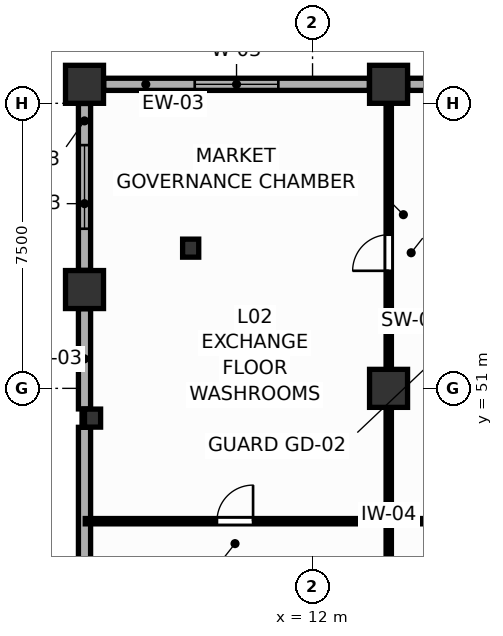
"""IFC4 building model, lengths in metres.
Left out: names, types, materials, properties, quantities, classifications, styles, units other than length and angle.
Written with IfcOpenShell. Run it as: python <this file> out.ifc"""

import sys

from ifc_helpers import new_model, si_unit, direction, frame, frame_2d, origin, origin_2d, place, context, subcontext, project, spatial, rectangle, i_section, extrude, source, transform, mapped, element, fill, save


model = new_model("IFC4")
c1 = context("Model", 3, precision=1e-05, world=origin(), true_north=direction((0.0, 1.0)))
c2 = subcontext(c1, "Body", "Model", "MODEL_VIEW")
j1 = project(units=[si_unit("LENGTHUNIT", "METRE"), si_unit("PLANEANGLEUNIT", "RADIAN")], contexts=[c1])
p1 = place(None, origin())
s1 = spatial("IfcSite", under=j1, at=p1, CompositionType="ELEMENT")
p2 = place(p1, origin())
s2 = spatial("IfcBuilding", under=s1, at=p2, CompositionType="ELEMENT")
p3 = place(p2, frame((0.0, 0.0, 9.6)))
s3 = spatial("IfcBuildingStorey", under=s2, at=p3, CompositionType="ELEMENT", Elevation=9.6)
m1 = source(origin(), c2, "Body", "SweptSolid", [
    extrude(rectangle(XDim=1.0, YDim=1.0, at=origin_2d()), origin(), (0.0, 0.0, 1.0), 4.8),
])
for number, where, z_axis, x_axis in (
    (1, (6.0, 53.6, 0.0), (0.0, 0.0, 1.0), (1.0, 0.0, 0.0)),
    (2, (6.0, 59.0, 0.0), (0.0, 0.0, 1.0), (1.0, 0.0, 0.0)),
    (3, (14.0, 59.0, 0.0), (0.0, 0.0, 1.0), (1.0, 0.0, 0.0)),
    (4, (14.0, 51.0, 0.0), (0.0, 0.0, 1.0), (1.0, 0.0, 0.0)),
):
    element("IfcColumn", number, at=place(p3, frame(where, z_axis=z_axis, x_axis=x_axis)), inside=s3, PredefinedType="COLUMN", context=c2, shape_type="MappedRepresentation", body=[
        mapped(m1, transform((0.0, 0.0, 0.0), scale=1.0)),
    ])
m2 = source(origin(), c2, "Body", "SweptSolid", [
    extrude(i_section(OverallWidth=0.424, OverallDepth=0.474, WebThickness=0.045, FlangeThickness=0.072, FilletRadius=0.015, at=origin_2d()), origin(), (0.0, 0.0, 1.0), 4.8),
])
for number, where, z_axis, x_axis in (
    (5, (8.793, 54.689, 0.0), (0.0, 0.0, 1.0), (1.0, 0.0, 0.0)),
    (6, (6.211, 50.217, 0.0), (0.0, 0.0, 1.0), (1.0, 0.0, 0.0)),
):
    element("IfcColumn", number, at=place(p3, frame(where, z_axis=z_axis, x_axis=x_axis)), inside=s3, PredefinedType="COLUMN", context=c2, shape_type="MappedRepresentation", body=[
        mapped(m2, transform((0.0, 0.0, 0.0), scale=1.0)),
    ])
p4 = place(p3, frame((6.505, 59.0, 0.0), z_axis=(0.0, 0.0, 1.0), x_axis=(1.0, 0.0, 0.0)))
e7 = element("IfcWall", 7, at=p4, inside=s3, PredefinedType="SOLIDWALL", context=c2, shape_type="SweptSolid", body=[
    extrude(rectangle(XDim=6.99, YDim=0.32, at=frame_2d((3.495, 0.0))), origin(), (0.0, 0.0, 1.0), 3.65),
])
p5 = place(p4, frame((2.395, 0.0, 0.75)))
e8 = element("IfcOpeningElement", 8, at=p5, cuts=e7, PredefinedType="OPENING", context=c2, shape_type="SweptSolid", body=[
    extrude(rectangle(XDim=2.2, YDim=2.0, at=frame_2d((1.1, 1.0))), frame((0.0, 0.17, 0.0), z_axis=(0.0, -1.0, 0.0), x_axis=(1.0, 0.0, 0.0)), (0.0, 0.0, 1.0), 0.34),
])
p6 = place(p3, frame((14.505, 59.0, 0.0), z_axis=(0.0, 0.0, 1.0), x_axis=(1.0, 0.0, 0.0)))
e9 = element("IfcWall", 9, at=p6, inside=s3, PredefinedType="SOLIDWALL", context=c2, shape_type="SweptSolid", body=[
    extrude(rectangle(XDim=12.59, YDim=0.32, at=frame_2d((6.295, 0.0))), origin(), (0.0, 0.0, 1.0), 3.65),
])
p7 = place(p6, frame((1.599, 0.0, 0.75)))
e10 = element("IfcOpeningElement", 10, at=p7, cuts=e9, PredefinedType="OPENING", context=c2, shape_type="SweptSolid", body=[
    extrude(rectangle(XDim=2.2, YDim=2.0, at=frame_2d((1.1, 1.0))), frame((0.0, 0.17, 0.0), z_axis=(0.0, -1.0, 0.0), x_axis=(1.0, 0.0, 0.0)), (0.0, 0.0, 1.0), 0.34),
])
p8 = place(p3, frame((6.0, 40.505, 0.0), z_axis=(0.0, 0.0, 1.0), x_axis=(0.0, 1.0, 0.0)))
e11 = element("IfcWall", 11, at=p8, inside=s3, PredefinedType="SOLIDWALL", context=c2, shape_type="SweptSolid", body=[
    extrude(rectangle(XDim=9.47, YDim=0.32, at=frame_2d((4.735, 0.0))), origin(), (0.0, 0.0, 1.0), 4.35),
])
p9 = place(p8, frame((3.635, 0.0, 0.75)))
e12 = element("IfcOpeningElement", 12, at=p9, cuts=e11, PredefinedType="OPENING", context=c2, shape_type="SweptSolid", body=[
    extrude(rectangle(XDim=2.2, YDim=2.0, at=frame_2d((1.1, 1.0))), frame((0.0, 0.17, 0.0), z_axis=(0.0, -1.0, 0.0), x_axis=(1.0, 0.0, 0.0)), (0.0, 0.0, 1.0), 0.34),
])
p10 = place(p3, frame((6.0, 50.459, 0.0), z_axis=(0.0, 0.0, 1.0), x_axis=(0.0, 1.0, 0.0)))
e13 = element("IfcWall", 13, at=p10, inside=s3, PredefinedType="SOLIDWALL", context=c2, shape_type="SweptSolid", body=[
    extrude(rectangle(XDim=2.636, YDim=0.32, at=frame_2d((1.318, 0.0))), origin(), (0.0, 0.0, 1.0), 4.35),
])
p11 = place(p3, frame((6.0, 54.105, 0.0), z_axis=(0.0, 0.0, 1.0), x_axis=(0.0, 1.0, 0.0)))
e14 = element("IfcWall", 14, at=p11, inside=s3, PredefinedType="SOLIDWALL", context=c2, shape_type="SweptSolid", body=[
    extrude(rectangle(XDim=4.39, YDim=0.32, at=frame_2d((2.195, 0.0))), origin(), (0.0, 0.0, 1.0), 4.35),
])
p12 = place(p11, frame((1.095, 0.0, 0.75)))
e15 = element("IfcOpeningElement", 15, at=p12, cuts=e14, PredefinedType="OPENING", context=c2, shape_type="SweptSolid", body=[
    extrude(rectangle(XDim=2.2, YDim=2.0, at=frame_2d((1.1, 1.0))), frame((0.0, 0.17, 0.0), z_axis=(0.0, -1.0, 0.0), x_axis=(1.0, 0.0, 0.0)), (0.0, 0.0, 1.0), 0.34),
])
p13 = place(p3, frame((14.005, 36.035, 0.0), z_axis=(0.0, 0.0, 1.0), x_axis=(0.0, 1.0, 0.0)))
e16 = element("IfcWall", 16, at=p13, inside=s3, PredefinedType="PARTITIONING", context=c2, shape_type="SweptSolid", body=[
    extrude(rectangle(XDim=22.945, YDim=0.14, at=frame_2d((11.473, 0.0))), origin(), (0.0, 0.0, 1.0), 4.35),
])
p14 = place(p13, frame((18.058, 0.0, 0.0)))
e17 = element("IfcOpeningElement", 17, at=p14, cuts=e16, PredefinedType="OPENING", context=c2, shape_type="SweptSolid", body=[
    extrude(rectangle(XDim=0.95, YDim=2.05, at=frame_2d((0.475, 1.025))), frame((0.0, 0.08, 0.0), z_axis=(0.0, -1.0, 0.0), x_axis=(1.0, 0.0, 0.0)), (0.0, 0.0, 1.0), 0.16),
])
p15 = place(p3, frame((6.02, 47.505, 0.0), z_axis=(0.0, 0.0, 1.0), x_axis=(1.0, 0.0, 0.0)))
e18 = element("IfcWall", 18, at=p15, inside=s3, PredefinedType="PARTITIONING", context=c2, shape_type="SweptSolid", body=[
    extrude(rectangle(XDim=13.563, YDim=0.14, at=frame_2d((6.781, 0.0))), origin(), (0.0, 0.0, 1.0), 4.35),
])
p16 = place(p15, frame((3.465, 0.0, 0.0)))
e19 = element("IfcOpeningElement", 19, at=p16, cuts=e18, PredefinedType="OPENING", context=c2, shape_type="SweptSolid", body=[
    extrude(rectangle(XDim=0.95, YDim=2.05, at=frame_2d((0.475, 1.025))), frame((0.0, 0.08, 0.0), z_axis=(0.0, -1.0, 0.0), x_axis=(1.0, 0.0, 0.0)), (0.0, 0.0, 1.0), 0.16),
])
p17 = place(p5, origin())
e20 = element("IfcWindow", 20, at=p17, inside=s3, PartitioningType="SINGLE_PANEL", PredefinedType="WINDOW", context=c2, shape_type="SweptSolid", body=[
    extrude(rectangle(XDim=2.2, YDim=2.0, at=frame_2d((1.1, 1.0))), frame((0.0, 0.03, 0.0), z_axis=(0.0, -1.0, 0.0), x_axis=(1.0, 0.0, 0.0)), (0.0, 0.0, 1.0), 0.06),
])
fill(e8, e20)
p18 = place(p12, origin())
e21 = element("IfcWindow", 21, at=p18, inside=s3, PartitioningType="SINGLE_PANEL", PredefinedType="WINDOW", context=c2, shape_type="SweptSolid", body=[
    extrude(rectangle(XDim=2.2, YDim=2.0, at=frame_2d((1.1, 1.0))), frame((0.0, 0.03, 0.0), z_axis=(0.0, -1.0, 0.0), x_axis=(1.0, 0.0, 0.0)), (0.0, 0.0, 1.0), 0.06),
])
fill(e15, e21)
p19 = place(p14, origin())
e22 = element("IfcDoor", 22, at=p19, inside=s3, OperationType="SINGLE_SWING_LEFT", PredefinedType="DOOR", context=c2, shape_type="SweptSolid", body=[
    extrude(rectangle(XDim=0.95, YDim=2.05, at=frame_2d((0.475, 1.025))), frame((0.0, 0.025, 0.0), z_axis=(0.0, -1.0, 0.0), x_axis=(1.0, 0.0, 0.0)), (0.0, 0.0, 1.0), 0.05),
])
fill(e17, e22)
p20 = place(p16, origin())
e23 = element("IfcDoor", 23, at=p20, inside=s3, OperationType="SINGLE_SWING_RIGHT", PredefinedType="DOOR", context=c2, shape_type="SweptSolid", body=[
    extrude(rectangle(XDim=0.95, YDim=2.05, at=frame_2d((0.475, 1.025))), frame((0.0, 0.025, 0.0), z_axis=(0.0, -1.0, 0.0), x_axis=(1.0, 0.0, 0.0)), (0.0, 0.0, 1.0), 0.05),
])
fill(e19, e23)
save(model, sys.argv[1])
